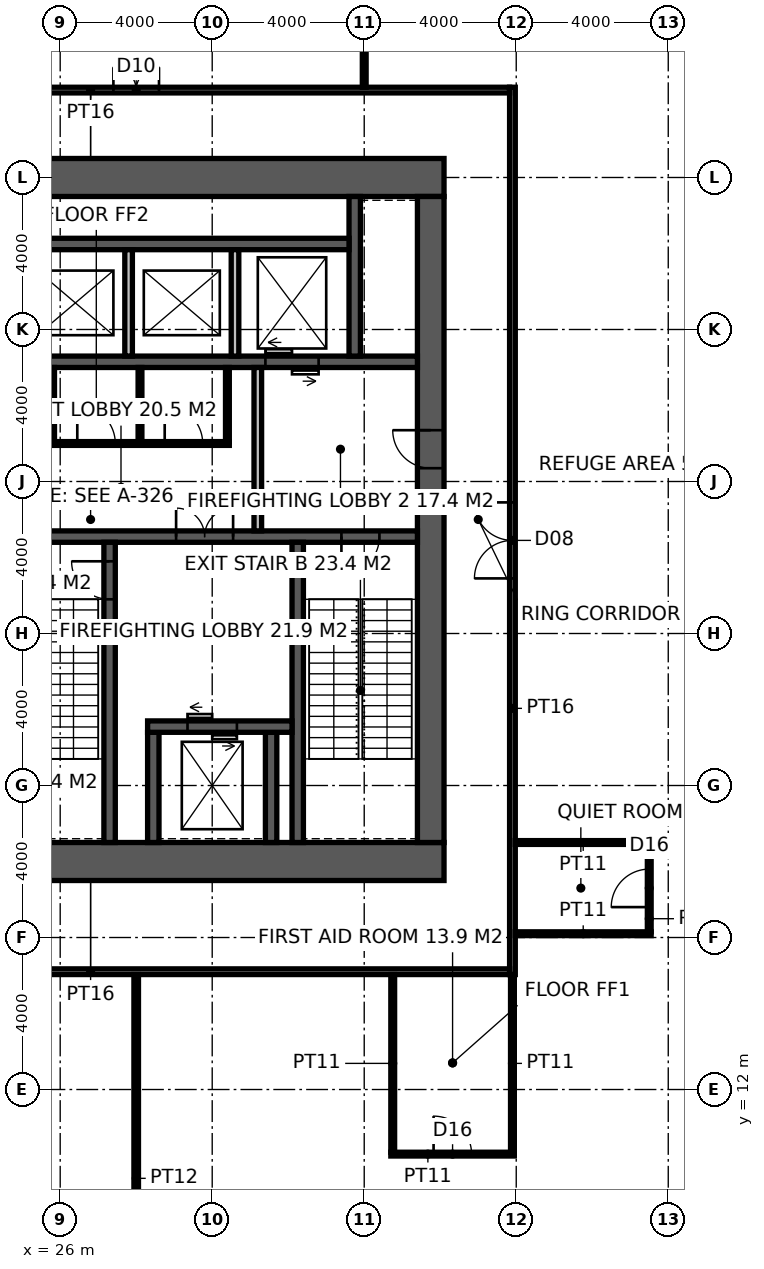
"""IFC4 building model, lengths in metres.
Left out: names, types, materials, properties, quantities, classifications, styles, units other than length and angle.
Written with IfcOpenShell. Run it as: python <this file> out.ifc"""

import sys

from ifc_helpers import new_model, si_unit, direction, frame, frame_2d, origin, place, context, subcontext, project, spatial, rectangle, extrude, element, fill, save


model = new_model("IFC4")
c1 = context("Model", 3, precision=1e-05, world=origin(), true_north=direction((0.0, 1.0)))
c2 = subcontext(c1, "Body", "Model", "MODEL_VIEW")
j1 = project(units=[si_unit("LENGTHUNIT", "METRE"), si_unit("PLANEANGLEUNIT", "RADIAN")], contexts=[c1])
p1 = place(None, origin())
s1 = spatial("IfcSite", under=j1, at=p1, CompositionType="ELEMENT")
p2 = place(p1, origin())
s2 = spatial("IfcBuilding", under=s1, at=p2, CompositionType="ELEMENT")
p3 = place(p2, frame((0.0, 0.0, 137.4)))
s3 = spatial("IfcBuildingStorey", under=s2, at=p3, CompositionType="ELEMENT", Elevation=137.4)
p4 = place(p3, frame((18.5, 18.0, -0.15), z_axis=(0.0, 0.0, 1.0), x_axis=(1.0, 0.0, 0.0)))
e1 = element("IfcWall", 1, at=p4, inside=s3, PredefinedType="SHEAR", context=c2, shape_type="SweptSolid", body=[
    extrude(rectangle(XDim=17.6, YDim=1.0, at=frame_2d((8.8, 0.0))), origin(), (0.0, 0.0, 1.0), 5.4),
])
p5 = place(p4, frame((3.45, 0.0, 0.15)))
e2 = element("IfcOpeningElement", 2, at=p5, cuts=e1, PredefinedType="OPENING", context=c2, shape_type="SweptSolid", body=[
    extrude(rectangle(XDim=1.5, YDim=2.4, at=frame_2d((0.75, 1.2))), frame((0.0, 0.51, 0.0), z_axis=(0.0, -1.0, 0.0), x_axis=(1.0, 0.0, 0.0)), (0.0, 0.0, 1.0), 1.02),
])
p6 = place(p3, frame((18.5, 36.0, -0.15), z_axis=(0.0, 0.0, 1.0), x_axis=(1.0, 0.0, 0.0)))
e3 = element("IfcWall", 3, at=p6, inside=s3, PredefinedType="SHEAR", context=c2, shape_type="SweptSolid", body=[
    extrude(rectangle(XDim=17.6, YDim=1.0, at=frame_2d((8.8, 0.0))), origin(), (0.0, 0.0, 1.0), 5.4),
])
p7 = place(p3, frame((35.75, 18.5, -0.15), z_axis=(0.0, 0.0, 1.0), x_axis=(0.0, 1.0, 0.0)))
e4 = element("IfcWall", 4, at=p7, inside=s3, PredefinedType="SHEAR", context=c2, shape_type="SweptSolid", body=[
    extrude(rectangle(XDim=17.0, YDim=0.7, at=frame_2d((8.5, 0.0))), origin(), (0.0, 0.0, 1.0), 5.4),
])
p8 = place(p7, frame((9.85, 0.0, 0.15)))
e5 = element("IfcOpeningElement", 5, at=p8, cuts=e4, PredefinedType="OPENING", context=c2, shape_type="SweptSolid", body=[
    extrude(rectangle(XDim=1.0, YDim=2.2, at=frame_2d((0.5, 1.1))), frame((0.0, 0.36, 0.0), z_axis=(0.0, -1.0, 0.0), x_axis=(1.0, 0.0, 0.0)), (0.0, 0.0, 1.0), 0.72),
])
p9 = place(p3, frame((24.15, 26.55, -0.15), z_axis=(0.0, 0.0, 1.0), x_axis=(1.0, 0.0, 0.0)))
e6 = element("IfcWall", 6, at=p9, inside=s3, PredefinedType="SHEAR", context=c2, shape_type="SweptSolid", body=[
    extrude(rectangle(XDim=11.25, YDim=0.3, at=frame_2d((5.625, 0.0))), origin(), (0.0, 0.0, 1.0), 5.4),
])
p10 = place(p9, frame((9.25, 0.0, 0.15)))
e7 = element("IfcOpeningElement", 7, at=p10, cuts=e6, PredefinedType="OPENING", context=c2, shape_type="SweptSolid", body=[
    extrude(rectangle(XDim=1.0, YDim=2.2, at=frame_2d((0.5, 1.1))), frame((0.0, 0.16, 0.0), z_axis=(0.0, -1.0, 0.0), x_axis=(1.0, 0.0, 0.0)), (0.0, 0.0, 1.0), 0.32),
])
p11 = place(p9, frame((4.9, 0.0, 0.15)))
e8 = element("IfcOpeningElement", 8, at=p11, cuts=e6, PredefinedType="OPENING", context=c2, shape_type="SweptSolid", body=[
    extrude(rectangle(XDim=1.5, YDim=2.4, at=frame_2d((0.75, 1.2))), frame((0.0, 0.16, 0.0), z_axis=(0.0, -1.0, 0.0), x_axis=(1.0, 0.0, 0.0)), (0.0, 0.0, 1.0), 0.32),
])
p12 = place(p3, frame((27.3, 18.5, -0.15), z_axis=(0.0, 0.0, 1.0), x_axis=(0.0, 1.0, 0.0)))
e9 = element("IfcWall", 9, at=p12, inside=s3, PredefinedType="SHEAR", context=c2, shape_type="SweptSolid", body=[
    extrude(rectangle(XDim=7.9, YDim=0.3, at=frame_2d((3.95, 0.0))), origin(), (0.0, 0.0, 1.0), 5.4),
])
p13 = place(p12, frame((6.4, 0.0, 0.15)))
e10 = element("IfcOpeningElement", 10, at=p13, cuts=e9, PredefinedType="OPENING", context=c2, shape_type="SweptSolid", body=[
    extrude(rectangle(XDim=1.0, YDim=2.2, at=frame_2d((0.5, 1.1))), frame((0.0, 0.16, 0.0), z_axis=(0.0, -1.0, 0.0), x_axis=(1.0, 0.0, 0.0)), (0.0, 0.0, 1.0), 0.32),
])
p14 = place(p3, frame((32.25, 18.5, -0.15), z_axis=(0.0, 0.0, 1.0), x_axis=(0.0, 1.0, 0.0)))
e11 = element("IfcWall", 11, at=p14, inside=s3, PredefinedType="SHEAR", context=c2, shape_type="SweptSolid", body=[
    extrude(rectangle(XDim=7.9, YDim=0.3, at=frame_2d((3.95, 0.0))), origin(), (0.0, 0.0, 1.0), 5.4),
])
for number, where, z_axis, x_axis in (
    (12, (28.45, 18.5, -0.15), (0.0, 0.0, 1.0), (0.0, 1.0, 0.0)),
    (13, (31.55, 18.5, -0.15), (0.0, 0.0, 1.0), (0.0, 1.0, 0.0)),
):
    element("IfcWall", number, at=place(p3, frame(where, z_axis=z_axis, x_axis=x_axis)), inside=s3, PredefinedType="SHEAR", context=c2, shape_type="SweptSolid", body=[
        extrude(rectangle(XDim=2.9, YDim=0.3, at=frame_2d((1.45, 0.0))), origin(), (0.0, 0.0, 1.0), 5.4),
    ])
p15 = place(p3, frame((28.3, 21.55, -0.15), z_axis=(0.0, 0.0, 1.0), x_axis=(1.0, 0.0, 0.0)))
e14 = element("IfcWall", 14, at=p15, inside=s3, PredefinedType="SHEAR", context=c2, shape_type="SweptSolid", body=[
    extrude(rectangle(XDim=3.8, YDim=0.3, at=frame_2d((1.9, 0.0))), origin(), (0.0, 0.0, 1.0), 5.4),
])
p16 = place(p15, frame((1.05, 0.0, 0.15)))
e15 = element("IfcOpeningElement", 15, at=p16, cuts=e14, PredefinedType="OPENING", context=c2, shape_type="SweptSolid", body=[
    extrude(rectangle(XDim=1.3, YDim=2.4, at=frame_2d((0.65, 1.2))), frame((0.0, 0.16, 0.0), z_axis=(0.0, -1.0, 0.0), x_axis=(1.0, 0.0, 0.0)), (0.0, 0.0, 1.0), 0.32),
])
p17 = place(p3, frame((24.15, 31.15, -0.15), z_axis=(0.0, 0.0, 1.0), x_axis=(1.0, 0.0, 0.0)))
e16 = element("IfcWall", 16, at=p17, inside=s3, PredefinedType="SHEAR", context=c2, shape_type="SweptSolid", body=[
    extrude(rectangle(XDim=11.25, YDim=0.3, at=frame_2d((5.625, 0.0))), origin(), (0.0, 0.0, 1.0), 5.4),
])
p18 = place(p17, frame((7.25, 0.0, 0.15)))
e17 = element("IfcOpeningElement", 17, at=p18, cuts=e16, PredefinedType="OPENING", context=c2, shape_type="SweptSolid", body=[
    extrude(rectangle(XDim=1.4, YDim=2.4, at=frame_2d((0.7, 1.2))), frame((0.0, 0.16, 0.0), z_axis=(0.0, -1.0, 0.0), x_axis=(1.0, 0.0, 0.0)), (0.0, 0.0, 1.0), 0.32),
])
p19 = place(p3, frame((33.75, 31.3, -0.15), z_axis=(0.0, 0.0, 1.0), x_axis=(0.0, 1.0, 0.0)))
e18 = element("IfcWall", 18, at=p19, inside=s3, PredefinedType="SHEAR", context=c2, shape_type="SweptSolid", body=[
    extrude(rectangle(XDim=4.2, YDim=0.3, at=frame_2d((2.1, 0.0))), origin(), (0.0, 0.0, 1.0), 5.4),
])
p20 = place(p3, frame((25.0, 34.25, -0.15), z_axis=(0.0, 0.0, 1.0), x_axis=(1.0, 0.0, 0.0)))
e19 = element("IfcWall", 19, at=p20, inside=s3, PredefinedType="SHEAR", context=c2, shape_type="SweptSolid", body=[
    extrude(rectangle(XDim=8.6, YDim=0.3, at=frame_2d((4.3, 0.0))), origin(), (0.0, 0.0, 1.0), 5.4),
])
for number, where, z_axis, x_axis in (
    (20, (27.8, 31.3, -0.15), (0.0, 0.0, 1.0), (0.0, 1.0, 0.0)),
    (21, (30.6, 31.3, -0.15), (0.0, 0.0, 1.0), (0.0, 1.0, 0.0)),
):
    element("IfcWall", number, at=place(p3, frame(where, z_axis=z_axis, x_axis=x_axis)), inside=s3, PredefinedType="SOLIDWALL", context=c2, shape_type="SweptSolid", body=[
        extrude(rectangle(XDim=2.8, YDim=0.2, at=frame_2d((1.4, 0.0))), origin(), (0.0, 0.0, 1.0), 5.4),
    ])
p21 = place(p3, frame((31.2, 26.7, 0.0), z_axis=(0.0, 0.0, 1.0), x_axis=(0.0, 1.0, 0.0)))
e22 = element("IfcWall", 22, at=p21, inside=s3, PredefinedType="SOLIDWALL", context=c2, shape_type="SweptSolid", body=[
    extrude(rectangle(XDim=4.3, YDim=0.2, at=frame_2d((2.15, 0.0))), origin(), (0.0, 0.0, 1.0), 5.25),
])
p22 = place(p3, frame((25.75, 29.0, 0.0), z_axis=(0.0, 0.0, 1.0), x_axis=(1.0, 0.0, 0.0)))
e23 = element("IfcWall", 23, at=p22, inside=s3, PredefinedType="PARTITIONING", context=c2, shape_type="SweptSolid", body=[
    extrude(rectangle(XDim=4.7, YDim=0.1, at=frame_2d((2.35, 0.0))), origin(), (0.0, 0.0, 1.0), 5.25),
])
p23 = place(p22, frame((0.7, 0.0, 0.0)))
e24 = element("IfcOpeningElement", 24, at=p23, cuts=e23, PredefinedType="OPENING", context=c2, shape_type="SweptSolid", body=[
    extrude(rectangle(XDim=1.0, YDim=2.2, at=frame_2d((0.5, 1.1))), frame((0.0, 0.06, 0.0), z_axis=(0.0, -1.0, 0.0), x_axis=(1.0, 0.0, 0.0)), (0.0, 0.0, 1.0), 0.12),
])
p24 = place(p22, frame((3.0, 0.0, 0.0)))
e25 = element("IfcOpeningElement", 25, at=p24, cuts=e23, PredefinedType="OPENING", context=c2, shape_type="SweptSolid", body=[
    extrude(rectangle(XDim=1.0, YDim=2.2, at=frame_2d((0.5, 1.1))), frame((0.0, 0.06, 0.0), z_axis=(0.0, -1.0, 0.0), x_axis=(1.0, 0.0, 0.0)), (0.0, 0.0, 1.0), 0.12),
])
for number, where, z_axis, x_axis in (
    (26, (25.8, 29.05, 0.0), (0.0, 0.0, 1.0), (0.0, 1.0, 0.0)),
    (27, (30.4, 29.05, 0.0), (0.0, 0.0, 1.0), (0.0, 1.0, 0.0)),
    (28, (28.1, 29.05, 0.0), (0.0, 0.0, 1.0), (0.0, 1.0, 0.0)),
):
    element("IfcWall", number, at=place(p3, frame(where, z_axis=z_axis, x_axis=x_axis)), inside=s3, PredefinedType="PARTITIONING", context=c2, shape_type="SweptSolid", body=[
        extrude(rectangle(XDim=1.95, YDim=0.1, at=frame_2d((0.975, 0.0))), origin(), (0.0, 0.0, 1.0), 5.25),
    ])
p25 = place(p3, frame((37.9, 15.025, 0.0), z_axis=(0.0, 0.0, 1.0), x_axis=(0.0, 1.0, 0.0)))
e29 = element("IfcWall", 29, at=p25, inside=s3, PredefinedType="PARTITIONING", context=c2, shape_type="SweptSolid", body=[
    extrude(rectangle(XDim=23.35, YDim=0.15, at=frame_2d((11.675, 0.0))), origin(), (0.0, 0.0, 1.0), 4.35),
])
p26 = place(p25, frame((10.425, 0.0, 0.0)))
e30 = element("IfcOpeningElement", 30, at=p26, cuts=e29, PredefinedType="OPENING", context=c2, shape_type="SweptSolid", body=[
    extrude(rectangle(XDim=2.0, YDim=2.4, at=frame_2d((1.0, 1.2))), frame((0.0, 0.085, 0.0), z_axis=(0.0, -1.0, 0.0), x_axis=(1.0, 0.0, 0.0)), (0.0, 0.0, 1.0), 0.17),
])
p27 = place(p3, frame((15.775, 15.1, 0.0), z_axis=(0.0, 0.0, 1.0), x_axis=(1.0, 0.0, 0.0)))
e31 = element("IfcWall", 31, at=p27, inside=s3, PredefinedType="PARTITIONING", context=c2, shape_type="SweptSolid", body=[
    extrude(rectangle(XDim=22.05, YDim=0.15, at=frame_2d((11.025, 0.0))), origin(), (0.0, 0.0, 1.0), 5.25),
])
p28 = place(p3, frame((15.775, 38.3, 0.0), z_axis=(0.0, 0.0, 1.0), x_axis=(1.0, 0.0, 0.0)))
e32 = element("IfcWall", 32, at=p28, inside=s3, PredefinedType="PARTITIONING", context=c2, shape_type="SweptSolid", body=[
    extrude(rectangle(XDim=22.05, YDim=0.15, at=frame_2d((11.025, 0.0))), origin(), (0.0, 0.0, 1.0), 5.25),
])
p29 = place(p28, frame((11.625, 0.0, 0.0)))
e33 = element("IfcOpeningElement", 33, at=p29, cuts=e32, PredefinedType="OPENING", context=c2, shape_type="SweptSolid", body=[
    extrude(rectangle(XDim=1.2, YDim=2.2, at=frame_2d((0.6, 1.1))), frame((0.0, 0.085, 0.0), z_axis=(0.0, -1.0, 0.0), x_axis=(1.0, 0.0, 0.0)), (0.0, 0.0, 1.0), 0.17),
])
p30 = place(p3, frame((34.0, 38.375, 0.0), z_axis=(0.0, 0.0, 1.0), x_axis=(0.0, 1.0, 0.0)))
e34 = element("IfcWall", 34, at=p30, inside=s3, PredefinedType="PARTITIONING", context=c2, shape_type="SweptSolid", body=[
    extrude(rectangle(XDim=3.675, YDim=0.1, at=frame_2d((1.837, 0.0))), origin(), (0.0, 0.0, 1.0), 4.25),
])
p31 = place(p3, frame((28.0, 4.3, 0.0), z_axis=(0.0, 0.0, 1.0), x_axis=(0.0, 1.0, 0.0)))
e35 = element("IfcWall", 35, at=p31, inside=s3, PredefinedType="PARTITIONING", context=c2, shape_type="SweptSolid", body=[
    extrude(rectangle(XDim=10.725, YDim=0.12, at=frame_2d((5.362, 0.0))), origin(), (0.0, 0.0, 1.0), 5.25),
])
p32 = place(p3, frame((34.7, 10.3, 0.0), z_axis=(0.0, 0.0, 1.0), x_axis=(1.0, 0.0, 0.0)))
e36 = element("IfcWall", 36, at=p32, inside=s3, PredefinedType="PARTITIONING", context=c2, shape_type="SweptSolid", body=[
    extrude(rectangle(XDim=3.25, YDim=0.1, at=frame_2d((1.625, 0.0))), origin(), (0.0, 0.0, 1.0), 5.25),
])
p33 = place(p32, frame((1.125, 0.0, 0.0)))
e37 = element("IfcOpeningElement", 37, at=p33, cuts=e36, PredefinedType="OPENING", context=c2, shape_type="SweptSolid", body=[
    extrude(rectangle(XDim=1.0, YDim=2.2, at=frame_2d((0.5, 1.1))), frame((0.0, 0.06, 0.0), z_axis=(0.0, -1.0, 0.0), x_axis=(1.0, 0.0, 0.0)), (0.0, 0.0, 1.0), 0.12),
])
for number, where, z_axis, x_axis in (
    (38, (37.975, 16.1, 0.0), (0.0, 0.0, 1.0), (1.0, 0.0, 0.0)),
    (39, (37.975, 18.5, 0.0), (0.0, 0.0, 1.0), (1.0, 0.0, 0.0)),
):
    element("IfcWall", number, at=place(p3, frame(where, z_axis=z_axis, x_axis=x_axis)), inside=s3, PredefinedType="PARTITIONING", context=c2, shape_type="SweptSolid", body=[
        extrude(rectangle(XDim=3.575, YDim=0.1, at=frame_2d((1.788, 0.0))), origin(), (0.0, 0.0, 1.0), 5.25),
    ])
p34 = place(p3, frame((34.75, 10.35, 0.0), z_axis=(0.0, 0.0, 1.0), x_axis=(0.0, 1.0, 0.0)))
e40 = element("IfcWall", 40, at=p34, inside=s3, PredefinedType="PARTITIONING", context=c2, shape_type="SweptSolid", body=[
    extrude(rectangle(XDim=4.675, YDim=0.1, at=frame_2d((2.337, 0.0))), origin(), (0.0, 0.0, 1.0), 5.25),
])
p35 = place(p3, frame((37.9, 10.35, 0.0), z_axis=(0.0, 0.0, 1.0), x_axis=(0.0, 1.0, 0.0)))
e41 = element("IfcWall", 41, at=p35, inside=s3, PredefinedType="PARTITIONING", context=c2, shape_type="SweptSolid", body=[
    extrude(rectangle(XDim=4.675, YDim=0.1, at=frame_2d((2.337, 0.0))), origin(), (0.0, 0.0, 1.0), 4.35),
])
p36 = place(p3, frame((41.5, 16.15, 0.0), z_axis=(0.0, 0.0, 1.0), x_axis=(0.0, 1.0, 0.0)))
e42 = element("IfcWall", 42, at=p36, inside=s3, PredefinedType="PARTITIONING", context=c2, shape_type="SweptSolid", body=[
    extrude(rectangle(XDim=2.3, YDim=0.1, at=frame_2d((1.15, 0.0))), origin(), (0.0, 0.0, 1.0), 5.25),
])
p37 = place(p36, frame((0.65, 0.0, 0.0)))
e43 = element("IfcOpeningElement", 43, at=p37, cuts=e42, PredefinedType="OPENING", context=c2, shape_type="SweptSolid", body=[
    extrude(rectangle(XDim=1.0, YDim=2.2, at=frame_2d((0.5, 1.1))), frame((0.0, 0.06, 0.0), z_axis=(0.0, -1.0, 0.0), x_axis=(1.0, 0.0, 0.0)), (0.0, 0.0, 1.0), 0.12),
])
p38 = place(p13, origin())
e44 = element("IfcDoor", 44, at=p38, inside=s3, OperationType="SINGLE_SWING_RIGHT", PredefinedType="DOOR", context=c2, shape_type="SweptSolid", body=[
    extrude(rectangle(XDim=1.0, YDim=2.2, at=frame_2d((0.5, 1.1))), frame((0.0, 0.025, 0.0), z_axis=(0.0, -1.0, 0.0), x_axis=(1.0, 0.0, 0.0)), (0.0, 0.0, 1.0), 0.05),
])
fill(e10, e44)
p39 = place(p10, frame((1.0, 0.0, 0.0), z_axis=(0.0, 0.0, 1.0), x_axis=(-1.0, 0.0, 0.0)))
e45 = element("IfcDoor", 45, at=p39, inside=s3, OperationType="SINGLE_SWING_RIGHT", PredefinedType="DOOR", context=c2, shape_type="SweptSolid", body=[
    extrude(rectangle(XDim=1.0, YDim=2.2, at=frame_2d((0.5, 1.1))), frame((0.0, 0.025, 0.0), z_axis=(0.0, -1.0, 0.0), x_axis=(1.0, 0.0, 0.0)), (0.0, 0.0, 1.0), 0.05),
])
fill(e7, e45)
p40 = place(p8, origin())
e46 = element("IfcDoor", 46, at=p40, inside=s3, OperationType="SINGLE_SWING_RIGHT", PredefinedType="DOOR", context=c2, shape_type="SweptSolid", body=[
    extrude(rectangle(XDim=1.0, YDim=2.2, at=frame_2d((0.5, 1.1))), frame((0.0, 0.025, 0.0), z_axis=(0.0, -1.0, 0.0), x_axis=(1.0, 0.0, 0.0)), (0.0, 0.0, 1.0), 0.05),
])
fill(e5, e46)
p41 = place(p11, origin())
e47 = element("IfcDoor", 47, at=p41, inside=s3, OperationType="DOUBLE_DOOR_DOUBLE_SWING", PredefinedType="DOOR", context=c2, shape_type="SweptSolid", body=[
    extrude(rectangle(XDim=1.5, YDim=2.4, at=frame_2d((0.75, 1.2))), frame((0.0, 0.025, 0.0), z_axis=(0.0, -1.0, 0.0), x_axis=(1.0, 0.0, 0.0)), (0.0, 0.0, 1.0), 0.05),
])
fill(e8, e47)
p42 = place(p23, origin())
e48 = element("IfcDoor", 48, at=p42, inside=s3, OperationType="SINGLE_SWING_LEFT", PredefinedType="DOOR", context=c2, shape_type="SweptSolid", body=[
    extrude(rectangle(XDim=1.0, YDim=2.2, at=frame_2d((0.5, 1.1))), frame((0.0, 0.025, 0.0), z_axis=(0.0, -1.0, 0.0), x_axis=(1.0, 0.0, 0.0)), (0.0, 0.0, 1.0), 0.05),
])
fill(e24, e48)
p43 = place(p24, origin())
e49 = element("IfcDoor", 49, at=p43, inside=s3, OperationType="SINGLE_SWING_LEFT", PredefinedType="DOOR", context=c2, shape_type="SweptSolid", body=[
    extrude(rectangle(XDim=1.0, YDim=2.2, at=frame_2d((0.5, 1.1))), frame((0.0, 0.025, 0.0), z_axis=(0.0, -1.0, 0.0), x_axis=(1.0, 0.0, 0.0)), (0.0, 0.0, 1.0), 0.05),
])
fill(e25, e49)
p44 = place(p29, origin())
e50 = element("IfcDoor", 50, at=p44, inside=s3, OperationType="DOUBLE_DOOR_DOUBLE_SWING", PredefinedType="DOOR", context=c2, shape_type="SweptSolid", body=[
    extrude(rectangle(XDim=1.2, YDim=2.2, at=frame_2d((0.6, 1.1))), frame((0.0, 0.025, 0.0), z_axis=(0.0, -1.0, 0.0), x_axis=(1.0, 0.0, 0.0)), (0.0, 0.0, 1.0), 0.05),
])
fill(e33, e50)
p45 = place(p26, origin())
e51 = element("IfcDoor", 51, at=p45, inside=s3, OperationType="DOUBLE_DOOR_DOUBLE_SWING", PredefinedType="DOOR", context=c2, shape_type="SweptSolid", body=[
    extrude(rectangle(XDim=2.0, YDim=2.4, at=frame_2d((1.0, 1.2))), frame((0.0, 0.025, 0.0), z_axis=(0.0, -1.0, 0.0), x_axis=(1.0, 0.0, 0.0)), (0.0, 0.0, 1.0), 0.05),
])
fill(e30, e51)
p46 = place(p33, origin())
e52 = element("IfcDoor", 52, at=p46, inside=s3, OperationType="SINGLE_SWING_LEFT", PredefinedType="DOOR", context=c2, shape_type="SweptSolid", body=[
    extrude(rectangle(XDim=1.0, YDim=2.2, at=frame_2d((0.5, 1.1))), frame((0.0, 0.025, 0.0), z_axis=(0.0, -1.0, 0.0), x_axis=(1.0, 0.0, 0.0)), (0.0, 0.0, 1.0), 0.05),
])
fill(e37, e52)
p47 = place(p37, origin())
e53 = element("IfcDoor", 53, at=p47, inside=s3, OperationType="SINGLE_SWING_LEFT", PredefinedType="DOOR", context=c2, shape_type="SweptSolid", body=[
    extrude(rectangle(XDim=1.0, YDim=2.2, at=frame_2d((0.5, 1.1))), frame((0.0, 0.025, 0.0), z_axis=(0.0, -1.0, 0.0), x_axis=(1.0, 0.0, 0.0)), (0.0, 0.0, 1.0), 0.05),
])
fill(e43, e53)
p48 = place(p16, origin())
e54 = element("IfcDoor", 54, at=p48, inside=s3, OperationType="DOUBLE_DOOR_SLIDING", PredefinedType="DOOR", context=c2, shape_type="SweptSolid", body=[
    extrude(rectangle(XDim=1.3, YDim=2.4, at=frame_2d((0.65, 1.2))), frame((0.0, 0.025, 0.0), z_axis=(0.0, -1.0, 0.0), x_axis=(1.0, 0.0, 0.0)), (0.0, 0.0, 1.0), 0.05),
])
fill(e15, e54)
p49 = place(p18, origin())
e55 = element("IfcDoor", 55, at=p49, inside=s3, OperationType="DOUBLE_DOOR_SLIDING", PredefinedType="DOOR", context=c2, shape_type="SweptSolid", body=[
    extrude(rectangle(XDim=1.4, YDim=2.4, at=frame_2d((0.7, 1.2))), frame((0.0, 0.025, 0.0), z_axis=(0.0, -1.0, 0.0), x_axis=(1.0, 0.0, 0.0)), (0.0, 0.0, 1.0), 0.05),
])
fill(e17, e55)
save(model, sys.argv[1])
